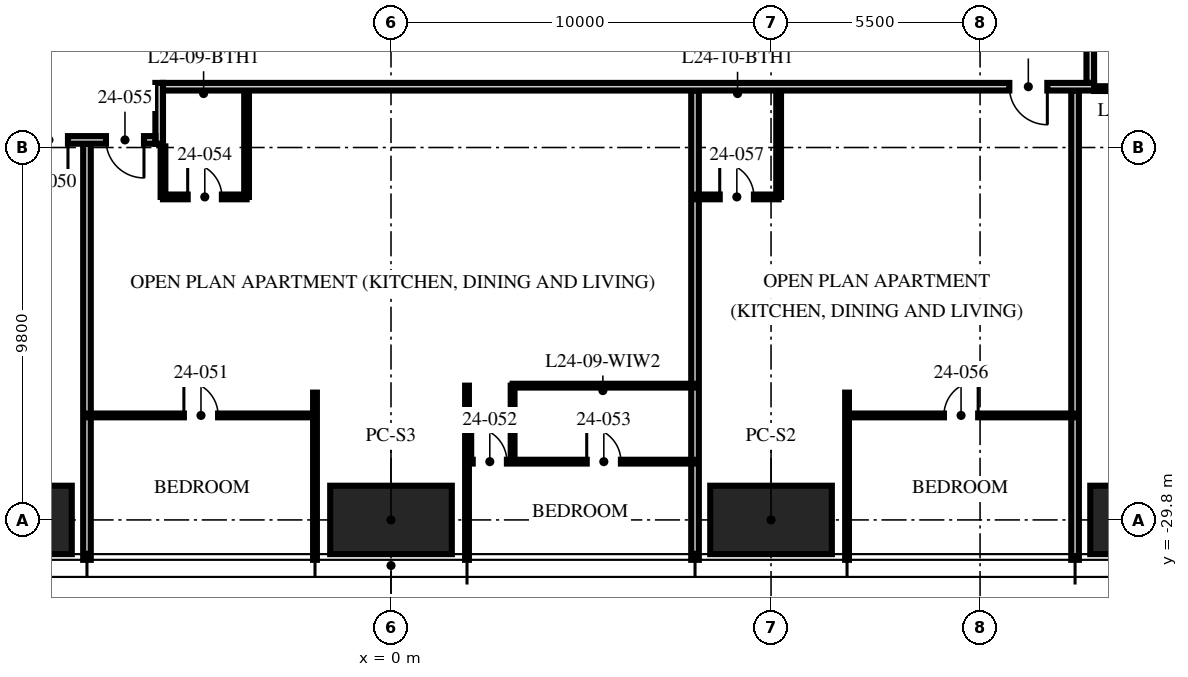
"""IFC4 building model, lengths in metres.
Left out: names, types, materials, properties, quantities, classifications, styles, units other than length and angle.
Written with IfcOpenShell. Run it as: python <this file> out.ifc"""

import sys

from ifc_helpers import new_model, si_unit, direction, frame, frame_2d, origin, origin_2d, place, context, subcontext, project, spatial, rectangle, hollow_rectangle, extrude, element, fill, save


model = new_model("IFC4")
c1 = context("Model", 3, precision=1e-05, world=origin(), true_north=direction((0.0, 1.0)))
c2 = subcontext(c1, "Body", "Model", "MODEL_VIEW")
j1 = project(units=[si_unit("LENGTHUNIT", "METRE"), si_unit("PLANEANGLEUNIT", "RADIAN")], contexts=[c1])
p1 = place(None, origin())
s1 = spatial("IfcSite", under=j1, at=p1, CompositionType="ELEMENT")
p2 = place(p1, origin())
s2 = spatial("IfcBuilding", under=s1, at=p2, CompositionType="ELEMENT")
p3 = place(p2, frame((0.0, 0.0, 96.0)))
s3 = spatial("IfcBuildingStorey", under=s2, at=p3, CompositionType="ELEMENT", Elevation=96.0)
p4 = place(p3, frame((20.0, -29.8, 0.0), z_axis=(0.0, 0.0, 1.0), x_axis=(1.0, 0.0, 0.0)))
e1 = element("IfcColumn", 1, at=p4, inside=s3, PredefinedType="COLUMN", context=c2, shape_type="SweptSolid", body=[
    extrude(hollow_rectangle(XDim=3.2, YDim=1.8, WallThickness=0.2, at=origin_2d()), origin(), (0.0, 0.0, 1.0), 2.47),
])
p5 = place(p3, frame((10.0, -29.8, 0.0), z_axis=(0.0, 0.0, 1.0), x_axis=(1.0, 0.0, 0.0)))
e2 = element("IfcColumn", 2, at=p5, inside=s3, PredefinedType="COLUMN", context=c2, shape_type="SweptSolid", body=[
    extrude(hollow_rectangle(XDim=3.2, YDim=1.8, WallThickness=0.2, at=origin_2d()), origin(), (0.0, 0.0, 1.0), 2.62),
])
p6 = place(p3, frame((0.0, -29.8, 0.0), z_axis=(0.0, 0.0, 1.0), x_axis=(1.0, 0.0, 0.0)))
e3 = element("IfcColumn", 3, at=p6, inside=s3, PredefinedType="COLUMN", context=c2, shape_type="SweptSolid", body=[
    extrude(hollow_rectangle(XDim=3.2, YDim=1.8, WallThickness=0.2, at=origin_2d()), origin(), (0.0, 0.0, 1.0), 2.78),
])
p7 = place(p3, frame((-10.0, -29.8, 0.0), z_axis=(0.0, 0.0, 1.0), x_axis=(1.0, 0.0, 0.0)))
e4 = element("IfcColumn", 4, at=p7, inside=s3, PredefinedType="COLUMN", context=c2, shape_type="SweptSolid", body=[
    extrude(hollow_rectangle(XDim=3.2, YDim=1.8, WallThickness=0.2, at=origin_2d()), origin(), (0.0, 0.0, 1.0), 2.62),
])
p8 = place(p3, frame((-8.0, -19.9, 0.0), z_axis=(0.0, 0.0, 1.0), x_axis=(0.0, -1.0, 0.0)))
e5 = element("IfcWall", 5, at=p8, inside=s3, PredefinedType="PARTITIONING", context=c2, shape_type="SweptSolid", body=[
    extrude(rectangle(XDim=10.95, YDim=0.2, at=frame_2d((5.475, 0.0))), origin(), (0.0, 0.0, 1.0), 2.7),
])
p9 = place(p3, frame((-2.0, -26.45, 0.0), z_axis=(0.0, 0.0, 1.0), x_axis=(0.0, -1.0, 0.0)))
e6 = element("IfcWall", 6, at=p9, inside=s3, PredefinedType="PARTITIONING", context=c2, shape_type="SweptSolid", body=[
    extrude(rectangle(XDim=4.4, YDim=0.1, at=frame_2d((2.2, 0.0))), origin(), (0.0, 0.0, 1.0), 2.7),
])
p10 = place(p3, frame((2.0, -26.267, 0.0), z_axis=(0.0, 0.0, 1.0), x_axis=(0.0, -1.0, 0.0)))
e7 = element("IfcWall", 7, at=p10, inside=s3, PredefinedType="PARTITIONING", context=c2, shape_type="SweptSolid", body=[
    extrude(rectangle(XDim=4.583, YDim=0.1, at=frame_2d((2.292, 0.0))), origin(), (0.0, 0.0, 1.0), 2.7),
])
p11 = place(p3, frame((8.0, -18.5, 0.0), z_axis=(0.0, 0.0, 1.0), x_axis=(0.0, -1.0, 0.0)))
e8 = element("IfcWall", 8, at=p11, inside=s3, PredefinedType="PARTITIONING", context=c2, shape_type="SweptSolid", body=[
    extrude(rectangle(XDim=12.35, YDim=0.2, at=frame_2d((6.175, 0.0))), origin(), (0.0, 0.0, 1.0), 2.7),
])
p12 = place(p3, frame((12.0, -26.45, 0.0), z_axis=(0.0, 0.0, 1.0), x_axis=(0.0, -1.0, 0.0)))
e9 = element("IfcWall", 9, at=p12, inside=s3, PredefinedType="PARTITIONING", context=c2, shape_type="SweptSolid", body=[
    extrude(rectangle(XDim=4.4, YDim=0.1, at=frame_2d((2.2, 0.0))), origin(), (0.0, 0.0, 1.0), 2.7),
])
p13 = place(p3, frame((18.0, -18.5, 0.0), z_axis=(0.0, 0.0, 1.0), x_axis=(0.0, -1.0, 0.0)))
e10 = element("IfcWall", 10, at=p13, inside=s3, PredefinedType="PARTITIONING", context=c2, shape_type="SweptSolid", body=[
    extrude(rectangle(XDim=12.35, YDim=0.2, at=frame_2d((6.175, 0.0))), origin(), (0.0, 0.0, 1.0), 2.3),
])
p14 = place(p3, frame((-8.0, -27.05, 0.0), z_axis=(0.0, 0.0, 1.0), x_axis=(1.0, 0.0, 0.0)))
e11 = element("IfcWall", 11, at=p14, inside=s3, PredefinedType="PARTITIONING", context=c2, shape_type="SweptSolid", body=[
    extrude(rectangle(XDim=6.0, YDim=0.1, at=frame_2d((3.0, 0.0))), origin(), (0.0, 0.0, 1.0), 2.2),
])
p15 = place(p14, frame((2.55, 0.0, 0.0)))
e12 = element("IfcOpeningElement", 12, at=p15, cuts=e11, PredefinedType="OPENING", context=c2, shape_type="SweptSolid", body=[
    extrude(rectangle(XDim=0.9, YDim=2.1, at=frame_2d((0.45, 1.05))), frame((0.0, 0.06, 0.0), z_axis=(0.0, -1.0, 0.0), x_axis=(1.0, 0.0, 0.0)), (0.0, 0.0, 1.0), 0.12),
])
p16 = place(p3, frame((2.0, -28.267, 0.0), z_axis=(0.0, 0.0, 1.0), x_axis=(1.0, 0.0, 0.0)))
e13 = element("IfcWall", 13, at=p16, inside=s3, PredefinedType="PARTITIONING", context=c2, shape_type="SweptSolid", body=[
    extrude(rectangle(XDim=6.0, YDim=0.1, at=frame_2d((3.0, 0.0))), origin(), (0.0, 0.0, 1.0), 2.2),
])
p17 = place(p16, frame((0.15, 0.0, 0.0)))
e14 = element("IfcOpeningElement", 14, at=p17, cuts=e13, PredefinedType="OPENING", context=c2, shape_type="SweptSolid", body=[
    extrude(rectangle(XDim=0.9, YDim=2.1, at=frame_2d((0.45, 1.05))), frame((0.0, 0.06, 0.0), z_axis=(0.0, -1.0, 0.0), x_axis=(1.0, 0.0, 0.0)), (0.0, 0.0, 1.0), 0.12),
])
p18 = place(p16, frame((3.15, 0.0, 0.0)))
e15 = element("IfcOpeningElement", 15, at=p18, cuts=e13, PredefinedType="OPENING", context=c2, shape_type="SweptSolid", body=[
    extrude(rectangle(XDim=0.9, YDim=2.1, at=frame_2d((0.45, 1.05))), frame((0.0, 0.06, 0.0), z_axis=(0.0, -1.0, 0.0), x_axis=(1.0, 0.0, 0.0)), (0.0, 0.0, 1.0), 0.12),
])
p19 = place(p3, frame((3.2, -26.267, 0.0), z_axis=(0.0, 0.0, 1.0), x_axis=(0.0, -1.0, 0.0)))
e16 = element("IfcWall", 16, at=p19, inside=s3, PredefinedType="PARTITIONING", context=c2, shape_type="SweptSolid", body=[
    extrude(rectangle(XDim=2.0, YDim=0.1, at=frame_2d((1.0, 0.0))), origin(), (0.0, 0.0, 1.0), 3.4),
])
p20 = place(p3, frame((3.2, -26.267, 0.0), z_axis=(0.0, 0.0, 1.0), x_axis=(1.0, 0.0, 0.0)))
e17 = element("IfcWall", 17, at=p20, inside=s3, PredefinedType="PARTITIONING", context=c2, shape_type="SweptSolid", body=[
    extrude(rectangle(XDim=4.8, YDim=0.1, at=frame_2d((2.4, 0.0))), origin(), (0.0, 0.0, 1.0), 2.2),
])
p21 = place(p3, frame((-6.0, -21.3, 0.0), z_axis=(0.0, 0.0, 1.0), x_axis=(1.0, 0.0, 0.0)))
e18 = element("IfcWall", 18, at=p21, inside=s3, PredefinedType="PARTITIONING", context=c2, shape_type="SweptSolid", body=[
    extrude(rectangle(XDim=2.2, YDim=0.125, at=frame_2d((1.1, 0.0))), origin(), (0.0, 0.0, 1.0), 2.2),
])
p22 = place(p21, frame((0.65, 0.0, 0.0)))
e19 = element("IfcOpeningElement", 19, at=p22, cuts=e18, PredefinedType="OPENING", context=c2, shape_type="SweptSolid", body=[
    extrude(rectangle(XDim=0.9, YDim=2.1, at=frame_2d((0.45, 1.05))), frame((0.0, 0.073, 0.0), z_axis=(0.0, -1.0, 0.0), x_axis=(1.0, 0.0, 0.0)), (0.0, 0.0, 1.0), 0.145),
])
p23 = place(p3, frame((-6.0, -19.97, 0.0), z_axis=(0.0, 0.0, 1.0), x_axis=(0.0, -1.0, 0.0)))
e20 = element("IfcWall", 20, at=p23, inside=s3, PredefinedType="PARTITIONING", context=c2, shape_type="SweptSolid", body=[
    extrude(rectangle(XDim=1.33, YDim=0.125, at=frame_2d((0.665, 0.0))), origin(), (0.0, 0.0, 1.0), 3.4),
])
p24 = place(p3, frame((-3.8, -18.5, 0.0), z_axis=(0.0, 0.0, 1.0), x_axis=(0.0, -1.0, 0.0)))
e21 = element("IfcWall", 21, at=p24, inside=s3, PredefinedType="PARTITIONING", context=c2, shape_type="SweptSolid", body=[
    extrude(rectangle(XDim=2.8, YDim=0.125, at=frame_2d((1.4, 0.0))), origin(), (0.0, 0.0, 1.0), 3.4),
])
p25 = place(p3, frame((12.0, -27.05, 0.0), z_axis=(0.0, 0.0, 1.0), x_axis=(1.0, 0.0, 0.0)))
e22 = element("IfcWall", 22, at=p25, inside=s3, PredefinedType="PARTITIONING", context=c2, shape_type="SweptSolid", body=[
    extrude(rectangle(XDim=6.0, YDim=0.1, at=frame_2d((3.0, 0.0))), origin(), (0.0, 0.0, 1.0), 2.2),
])
p26 = place(p25, frame((2.55, 0.0, 0.0)))
e23 = element("IfcOpeningElement", 23, at=p26, cuts=e22, PredefinedType="OPENING", context=c2, shape_type="SweptSolid", body=[
    extrude(rectangle(XDim=0.9, YDim=2.1, at=frame_2d((0.45, 1.05))), frame((0.0, 0.06, 0.0), z_axis=(0.0, -1.0, 0.0), x_axis=(1.0, 0.0, 0.0)), (0.0, 0.0, 1.0), 0.12),
])
p27 = place(p3, frame((8.0, -21.3, 0.0), z_axis=(0.0, 0.0, 1.0), x_axis=(1.0, 0.0, 0.0)))
e24 = element("IfcWall", 24, at=p27, inside=s3, PredefinedType="PARTITIONING", context=c2, shape_type="SweptSolid", body=[
    extrude(rectangle(XDim=2.2, YDim=0.125, at=frame_2d((1.1, 0.0))), origin(), (0.0, 0.0, 1.0), 2.3),
])
p28 = place(p27, frame((0.65, 0.0, 0.0)))
e25 = element("IfcOpeningElement", 25, at=p28, cuts=e24, PredefinedType="OPENING", context=c2, shape_type="SweptSolid", body=[
    extrude(rectangle(XDim=0.9, YDim=2.1, at=frame_2d((0.45, 1.05))), frame((0.0, 0.073, 0.0), z_axis=(0.0, -1.0, 0.0), x_axis=(1.0, 0.0, 0.0)), (0.0, 0.0, 1.0), 0.145),
])
for number, where, z_axis, x_axis in (
    (26, (10.2, -18.5, 0.0), (0.0, 0.0, 1.0), (0.0, -1.0, 0.0)),
    (27, (18.5, -18.45, 0.0), (0.0, 0.0, 1.0), (1.0, 0.0, 0.0)),
):
    element("IfcWall", number, at=place(p3, frame(where, z_axis=z_axis, x_axis=x_axis)), inside=s3, PredefinedType="PARTITIONING", context=c2, shape_type="SweptSolid", body=[
        extrude(rectangle(XDim=2.8, YDim=0.125, at=frame_2d((1.4, 0.0))), origin(), (0.0, 0.0, 1.0), 2.3),
    ])
p29 = place(p3, frame((18.4, -18.3, 0.0), z_axis=(0.0, 0.0, 1.0), x_axis=(0.0, 1.0, 0.0)))
e28 = element("IfcWall", 28, at=p29, inside=s3, PredefinedType="PARTITIONING", context=c2, shape_type="SweptSolid", body=[
    extrude(rectangle(XDim=8.3, YDim=0.2, at=frame_2d((4.15, 0.0))), origin(), (0.0, 0.0, 1.0), 2.2),
])
p30 = place(p3, frame((18.5, -18.4, 0.0), z_axis=(0.0, 0.0, 1.0), x_axis=(-1.0, 0.0, 0.0)))
e29 = element("IfcWall", 29, at=p30, inside=s3, PredefinedType="PARTITIONING", context=c2, shape_type="SweptSolid", body=[
    extrude(rectangle(XDim=24.5, YDim=0.2, at=frame_2d((12.25, 0.0))), origin(), (0.0, 0.0, 1.0), 2.2),
])
p31 = place(p30, frame((1.23, 0.0, 0.0)))
e30 = element("IfcOpeningElement", 30, at=p31, cuts=e29, PredefinedType="OPENING", context=c2, shape_type="SweptSolid", body=[
    extrude(rectangle(XDim=1.0, YDim=2.2, at=frame_2d((0.5, 1.1))), frame((0.0, 0.11, 0.0), z_axis=(0.0, -1.0, 0.0), x_axis=(1.0, 0.0, 0.0)), (0.0, 0.0, 1.0), 0.22),
])
p32 = place(p3, frame((-6.1, -18.3, 0.0), z_axis=(0.0, 0.0, 1.0), x_axis=(0.0, -1.0, 0.0)))
e31 = element("IfcWall", 31, at=p32, inside=s3, PredefinedType="PARTITIONING", context=c2, shape_type="SweptSolid", body=[
    extrude(rectangle(XDim=1.6, YDim=0.2, at=frame_2d((0.8, 0.0))), origin(), (0.0, 0.0, 1.0), 3.4),
])
p33 = place(p3, frame((-6.2, -19.8, 0.0), z_axis=(0.0, 0.0, 1.0), x_axis=(-1.0, 0.0, 0.0)))
e32 = element("IfcWall", 32, at=p33, inside=s3, PredefinedType="PARTITIONING", context=c2, shape_type="SweptSolid", body=[
    extrude(rectangle(XDim=3.6, YDim=0.2, at=frame_2d((1.8, 0.0))), origin(), (0.0, 0.0, 1.0), 2.3),
])
p34 = place(p33, frame((2.3, 0.0, 0.0)))
e33 = element("IfcOpeningElement", 33, at=p34, cuts=e32, PredefinedType="OPENING", context=c2, shape_type="SweptSolid", body=[
    extrude(rectangle(XDim=1.0, YDim=2.2, at=frame_2d((0.5, 1.1))), frame((0.0, 0.11, 0.0), z_axis=(0.0, -1.0, 0.0), x_axis=(1.0, 0.0, 0.0)), (0.0, 0.0, 1.0), 0.22),
])
p35 = place(p33, frame((0.3, 0.0, 0.0)))
e34 = element("IfcOpeningElement", 34, at=p35, cuts=e32, PredefinedType="OPENING", context=c2, shape_type="SweptSolid", body=[
    extrude(rectangle(XDim=1.0, YDim=2.2, at=frame_2d((0.5, 1.1))), frame((0.0, 0.11, 0.0), z_axis=(0.0, -1.0, 0.0), x_axis=(1.0, 0.0, 0.0)), (0.0, 0.0, 1.0), 0.22),
])
p36 = place(p34, origin())
e35 = element("IfcDoor", 35, at=p36, inside=s3, OperationType="SINGLE_SWING_LEFT", PredefinedType="DOOR", context=c2, shape_type="SweptSolid", body=[
    extrude(rectangle(XDim=1.0, YDim=2.2, at=frame_2d((0.5, 1.1))), frame((0.0, 0.025, 0.0), z_axis=(0.0, -1.0, 0.0), x_axis=(1.0, 0.0, 0.0)), (0.0, 0.0, 1.0), 0.05),
])
fill(e33, e35)
p37 = place(p15, origin())
e36 = element("IfcDoor", 36, at=p37, inside=s3, OperationType="SINGLE_SWING_LEFT", PredefinedType="DOOR", context=c2, shape_type="SweptSolid", body=[
    extrude(rectangle(XDim=0.9, YDim=2.1, at=frame_2d((0.45, 1.05))), frame((0.0, 0.025, 0.0), z_axis=(0.0, -1.0, 0.0), x_axis=(1.0, 0.0, 0.0)), (0.0, 0.0, 1.0), 0.05),
])
fill(e12, e36)
p38 = place(p17, origin())
e37 = element("IfcDoor", 37, at=p38, inside=s3, OperationType="SINGLE_SWING_LEFT", PredefinedType="DOOR", context=c2, shape_type="SweptSolid", body=[
    extrude(rectangle(XDim=0.9, YDim=2.1, at=frame_2d((0.45, 1.05))), frame((0.0, 0.025, 0.0), z_axis=(0.0, -1.0, 0.0), x_axis=(1.0, 0.0, 0.0)), (0.0, 0.0, 1.0), 0.05),
])
fill(e14, e37)
p39 = place(p18, origin())
e38 = element("IfcDoor", 38, at=p39, inside=s3, OperationType="SINGLE_SWING_LEFT", PredefinedType="DOOR", context=c2, shape_type="SweptSolid", body=[
    extrude(rectangle(XDim=0.9, YDim=2.1, at=frame_2d((0.45, 1.05))), frame((0.0, 0.025, 0.0), z_axis=(0.0, -1.0, 0.0), x_axis=(1.0, 0.0, 0.0)), (0.0, 0.0, 1.0), 0.05),
])
fill(e15, e38)
p40 = place(p22, origin())
e39 = element("IfcDoor", 39, at=p40, inside=s3, OperationType="SINGLE_SWING_LEFT", PredefinedType="DOOR", context=c2, shape_type="SweptSolid", body=[
    extrude(rectangle(XDim=0.9, YDim=2.1, at=frame_2d((0.45, 1.05))), frame((0.0, 0.025, 0.0), z_axis=(0.0, -1.0, 0.0), x_axis=(1.0, 0.0, 0.0)), (0.0, 0.0, 1.0), 0.05),
])
fill(e19, e39)
p41 = place(p35, origin())
e40 = element("IfcDoor", 40, at=p41, inside=s3, OperationType="SINGLE_SWING_LEFT", PredefinedType="DOOR", context=c2, shape_type="SweptSolid", body=[
    extrude(rectangle(XDim=1.0, YDim=2.2, at=frame_2d((0.5, 1.1))), frame((0.0, 0.025, 0.0), z_axis=(0.0, -1.0, 0.0), x_axis=(1.0, 0.0, 0.0)), (0.0, 0.0, 1.0), 0.05),
])
fill(e34, e40)
p42 = place(p26, origin())
e41 = element("IfcDoor", 41, at=p42, inside=s3, OperationType="SINGLE_SWING_RIGHT", PredefinedType="DOOR", context=c2, shape_type="SweptSolid", body=[
    extrude(rectangle(XDim=0.9, YDim=2.1, at=frame_2d((0.45, 1.05))), frame((0.0, 0.025, 0.0), z_axis=(0.0, -1.0, 0.0), x_axis=(1.0, 0.0, 0.0)), (0.0, 0.0, 1.0), 0.05),
])
fill(e23, e41)
p43 = place(p28, origin())
e42 = element("IfcDoor", 42, at=p43, inside=s3, OperationType="SINGLE_SWING_LEFT", PredefinedType="DOOR", context=c2, shape_type="SweptSolid", body=[
    extrude(rectangle(XDim=0.9, YDim=2.1, at=frame_2d((0.45, 1.05))), frame((0.0, 0.025, 0.0), z_axis=(0.0, -1.0, 0.0), x_axis=(1.0, 0.0, 0.0)), (0.0, 0.0, 1.0), 0.05),
])
fill(e25, e42)
p44 = place(p31, origin())
e43 = element("IfcDoor", 43, at=p44, inside=s3, OperationType="SINGLE_SWING_LEFT", PredefinedType="DOOR", context=c2, shape_type="SweptSolid", body=[
    extrude(rectangle(XDim=1.0, YDim=2.2, at=frame_2d((0.5, 1.1))), frame((0.0, 0.025, 0.0), z_axis=(0.0, -1.0, 0.0), x_axis=(1.0, 0.0, 0.0)), (0.0, 0.0, 1.0), 0.05),
])
fill(e30, e43)
save(model, sys.argv[1])
